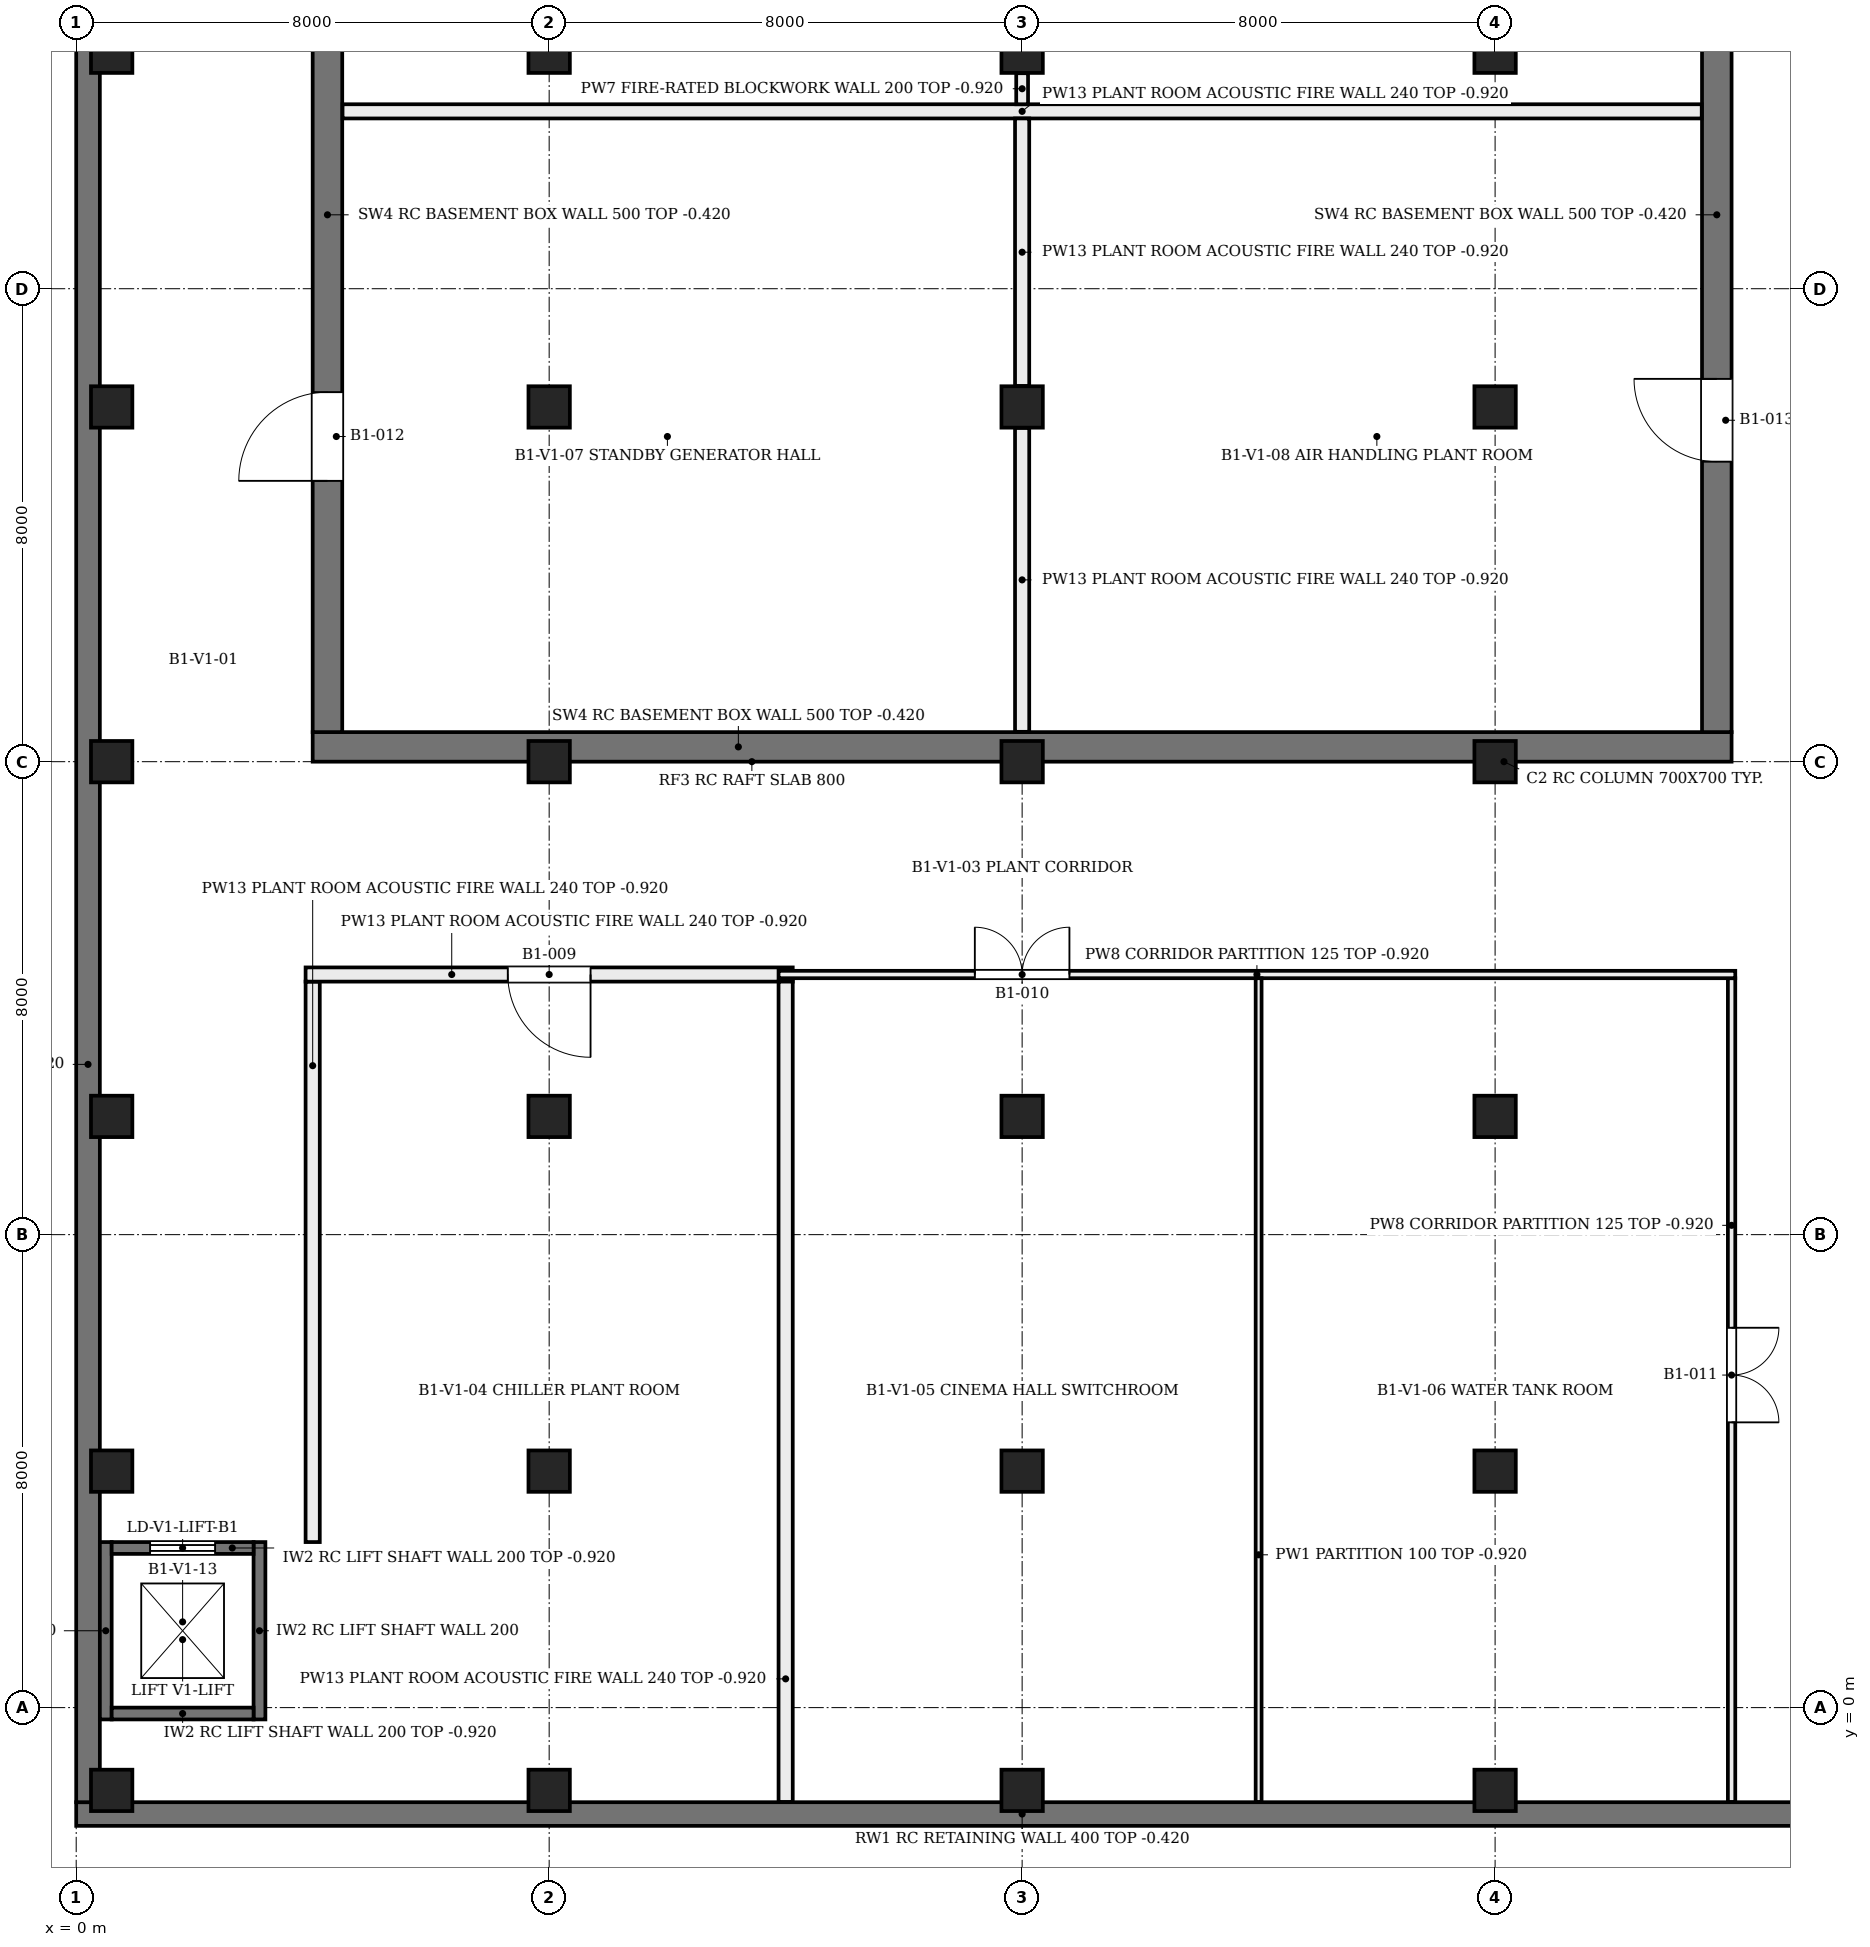
"""IFC4 building model, lengths in metres.
Left out: names, types, materials, properties, quantities, classifications, styles, units other than length and angle.
Written with IfcOpenShell. Run it as: python <this file> out.ifc"""

import sys

from ifc_helpers import new_model, si_unit, direction, frame, frame_2d, origin, origin_2d, place, context, subcontext, project, spatial, rectangle, extrude, element, fill, save


model = new_model("IFC4")
c1 = context("Model", 3, precision=1e-05, world=origin(), true_north=direction((0.0, 1.0)))
c2 = subcontext(c1, "Body", "Model", "MODEL_VIEW")
j1 = project(units=[si_unit("LENGTHUNIT", "METRE"), si_unit("PLANEANGLEUNIT", "RADIAN")], contexts=[c1])
p1 = place(None, origin())
s1 = spatial("IfcSite", under=j1, at=p1, CompositionType="ELEMENT")
p2 = place(p1, origin())
s2 = spatial("IfcBuilding", under=s1, at=p2, CompositionType="ELEMENT")
p3 = place(p2, frame((0.0, 0.0, -4.8)))
s3 = spatial("IfcBuildingStorey", under=s2, at=p3, CompositionType="ELEMENT", Elevation=-4.8)
p4 = place(p3, frame((4.0, 16.25, 0.0), z_axis=(0.0, 0.0, 1.0), x_axis=(1.0, 0.0, 0.0)))
e1 = element("IfcWall", 1, at=p4, inside=s3, PredefinedType="SHEAR", context=c2, shape_type="SweptSolid", body=[
    extrude(rectangle(XDim=24.0, YDim=0.5, at=frame_2d((12.0, 0.0))), origin(), (0.0, 0.0, 1.0), 4.38),
])
p5 = place(p3, frame((4.25, 16.5, 0.0), z_axis=(0.0, 0.0, 1.0), x_axis=(0.0, 1.0, 0.0)))
e2 = element("IfcWall", 2, at=p5, inside=s3, PredefinedType="SHEAR", context=c2, shape_type="SweptSolid", body=[
    extrude(rectangle(XDim=22.4, YDim=0.5, at=frame_2d((11.2, 0.0))), origin(), (0.0, 0.0, 1.0), 4.38),
])
p6 = place(p5, frame((4.25, 0.0, 0.0)))
e3 = element("IfcOpeningElement", 3, at=p6, cuts=e2, PredefinedType="OPENING", context=c2, shape_type="SweptSolid", body=[
    extrude(rectangle(XDim=1.5, YDim=2.7, at=frame_2d((0.75, 1.35))), frame((0.0, 0.26, 0.0), z_axis=(0.0, -1.0, 0.0), x_axis=(1.0, 0.0, 0.0)), (0.0, 0.0, 1.0), 0.52),
])
p7 = place(p5, frame((12.725, 0.0, 0.0)))
e4 = element("IfcOpeningElement", 4, at=p7, cuts=e2, PredefinedType="OPENING", context=c2, shape_type="SweptSolid", body=[
    extrude(rectangle(XDim=1.2, YDim=2.1, at=frame_2d((0.6, 1.05))), frame((0.0, 0.26, 0.0), z_axis=(0.0, -1.0, 0.0), x_axis=(1.0, 0.0, 0.0)), (0.0, 0.0, 1.0), 0.52),
])
p8 = place(p3, frame((27.75, 16.5, 0.0), z_axis=(0.0, 0.0, 1.0), x_axis=(0.0, 1.0, 0.0)))
e5 = element("IfcWall", 5, at=p8, inside=s3, PredefinedType="SHEAR", context=c2, shape_type="SweptSolid", body=[
    extrude(rectangle(XDim=22.4, YDim=0.5, at=frame_2d((11.2, 0.0))), origin(), (0.0, 0.0, 1.0), 4.38),
])
p9 = place(p8, frame((4.575, 0.0, 0.0)))
e6 = element("IfcOpeningElement", 6, at=p9, cuts=e5, PredefinedType="OPENING", context=c2, shape_type="SweptSolid", body=[
    extrude(rectangle(XDim=1.4, YDim=2.4, at=frame_2d((0.7, 1.2))), frame((0.0, 0.26, 0.0), z_axis=(0.0, -1.0, 0.0), x_axis=(1.0, 0.0, 0.0)), (0.0, 0.0, 1.0), 0.52),
])
p10 = place(p8, frame((13.15, 0.0, 0.0)))
e7 = element("IfcOpeningElement", 7, at=p10, cuts=e5, PredefinedType="OPENING", context=c2, shape_type="SweptSolid", body=[
    extrude(rectangle(XDim=0.9, YDim=2.4, at=frame_2d((0.45, 1.2))), frame((0.0, 0.26, 0.0), z_axis=(0.0, -1.0, 0.0), x_axis=(1.0, 0.0, 0.0)), (0.0, 0.0, 1.0), 0.52),
])
p11 = place(p3, frame((0.0, -1.8, 0.0), z_axis=(0.0, 0.0, 1.0), x_axis=(1.0, 0.0, 0.0)))
e8 = element("IfcWall", 8, at=p11, inside=s3, PredefinedType="SOLIDWALL", context=c2, shape_type="SweptSolid", body=[
    extrude(rectangle(XDim=32.0, YDim=0.4, at=frame_2d((16.0, 0.0))), origin(), (0.0, 0.0, 1.0), 4.38),
])
p12 = place(p3, frame((0.2, -1.6, 0.0), z_axis=(0.0, 0.0, 1.0), x_axis=(0.0, 1.0, 0.0)))
e9 = element("IfcWall", 9, at=p12, inside=s3, PredefinedType="SOLIDWALL", context=c2, shape_type="SweptSolid", body=[
    extrude(rectangle(XDim=41.6, YDim=0.4, at=frame_2d((20.8, 0.0))), origin(), (0.0, 0.0, 1.0), 4.38),
])
for number, where, z_axis, x_axis in (
    (10, (0.6, -1.4, 0.0), (0.0, 0.0, 1.0), (1.0, 0.0, 0.0)),
    (11, (0.6, 4.0, 0.0), (0.0, 0.0, 1.0), (1.0, 0.0, 0.0)),
    (12, (0.6, 10.0, 0.0), (0.0, 0.0, 1.0), (1.0, 0.0, 0.0)),
    (13, (0.6, 16.0, 0.0), (0.0, 0.0, 1.0), (1.0, 0.0, 0.0)),
    (14, (0.6, 22.0, 0.0), (0.0, 0.0, 1.0), (1.0, 0.0, 0.0)),
    (15, (0.6, 28.0, 0.0), (0.0, 0.0, 1.0), (1.0, 0.0, 0.0)),
    (16, (8.0, -1.4, 0.0), (0.0, 0.0, 1.0), (1.0, 0.0, 0.0)),
    (17, (8.0, 4.0, 0.0), (0.0, 0.0, 1.0), (1.0, 0.0, 0.0)),
    (18, (8.0, 10.0, 0.0), (0.0, 0.0, 1.0), (1.0, 0.0, 0.0)),
    (19, (8.0, 16.0, 0.0), (0.0, 0.0, 1.0), (1.0, 0.0, 0.0)),
    (20, (8.0, 22.0, 0.0), (0.0, 0.0, 1.0), (1.0, 0.0, 0.0)),
    (21, (8.0, 28.0, 0.0), (0.0, 0.0, 1.0), (1.0, 0.0, 0.0)),
    (22, (16.0, -1.4, 0.0), (0.0, 0.0, 1.0), (1.0, 0.0, 0.0)),
    (23, (16.0, 4.0, 0.0), (0.0, 0.0, 1.0), (1.0, 0.0, 0.0)),
    (24, (16.0, 10.0, 0.0), (0.0, 0.0, 1.0), (1.0, 0.0, 0.0)),
    (25, (16.0, 16.0, 0.0), (0.0, 0.0, 1.0), (1.0, 0.0, 0.0)),
    (26, (16.0, 22.0, 0.0), (0.0, 0.0, 1.0), (1.0, 0.0, 0.0)),
    (27, (16.0, 28.0, 0.0), (0.0, 0.0, 1.0), (1.0, 0.0, 0.0)),
    (28, (24.0, -1.4, 0.0), (0.0, 0.0, 1.0), (1.0, 0.0, 0.0)),
    (29, (24.0, 4.0, 0.0), (0.0, 0.0, 1.0), (1.0, 0.0, 0.0)),
    (30, (24.0, 10.0, 0.0), (0.0, 0.0, 1.0), (1.0, 0.0, 0.0)),
    (31, (24.0, 16.0, 0.0), (0.0, 0.0, 1.0), (1.0, 0.0, 0.0)),
    (32, (24.0, 22.0, 0.0), (0.0, 0.0, 1.0), (1.0, 0.0, 0.0)),
    (33, (24.0, 28.0, 0.0), (0.0, 0.0, 1.0), (1.0, 0.0, 0.0)),
):
    element("IfcColumn", number, at=place(p3, frame(where, z_axis=z_axis, x_axis=x_axis)), inside=s3, PredefinedType="COLUMN", context=c2, shape_type="SweptSolid", body=[
        extrude(rectangle(XDim=0.7, YDim=0.7, at=origin_2d()), origin(), (0.0, 0.0, 1.0), 4.38),
    ])
p13 = place(p3, frame((0.5, -0.2, 0.0), z_axis=(0.0, 0.0, 1.0), x_axis=(0.0, 1.0, 0.0)))
e34 = element("IfcWall", 34, at=p13, inside=s3, PredefinedType="SOLIDWALL", context=c2, shape_type="SweptSolid", body=[
    extrude(rectangle(XDim=3.0, YDim=0.2, at=frame_2d((1.5, 0.0))), origin(), (0.0, 0.0, 1.0), 3.88),
])
p14 = place(p3, frame((3.1, -0.2, 0.0), z_axis=(0.0, 0.0, 1.0), x_axis=(0.0, 1.0, 0.0)))
e35 = element("IfcWall", 35, at=p14, inside=s3, PredefinedType="SOLIDWALL", context=c2, shape_type="SweptSolid", body=[
    extrude(rectangle(XDim=3.0, YDim=0.2, at=frame_2d((1.5, 0.0))), origin(), (0.0, 0.0, 1.0), 4.55),
])
p15 = place(p3, frame((0.6, -0.1, 0.0), z_axis=(0.0, 0.0, 1.0), x_axis=(1.0, 0.0, 0.0)))
e36 = element("IfcWall", 36, at=p15, inside=s3, PredefinedType="SOLIDWALL", context=c2, shape_type="SweptSolid", body=[
    extrude(rectangle(XDim=2.4, YDim=0.2, at=frame_2d((1.2, 0.0))), origin(), (0.0, 0.0, 1.0), 3.88),
])
p16 = place(p3, frame((0.6, 2.7, 0.0), z_axis=(0.0, 0.0, 1.0), x_axis=(1.0, 0.0, 0.0)))
e37 = element("IfcWall", 37, at=p16, inside=s3, PredefinedType="SOLIDWALL", context=c2, shape_type="SweptSolid", body=[
    extrude(rectangle(XDim=2.4, YDim=0.2, at=frame_2d((1.2, 0.0))), origin(), (0.0, 0.0, 1.0), 3.88),
])
p17 = place(p16, frame((0.65, 0.0, 0.0)))
e38 = element("IfcOpeningElement", 38, at=p17, cuts=e37, PredefinedType="OPENING", context=c2, shape_type="SweptSolid", body=[
    extrude(rectangle(XDim=1.1, YDim=2.1, at=frame_2d((0.55, 1.05))), frame((0.0, 0.11, 0.0), z_axis=(0.0, -1.0, 0.0), x_axis=(1.0, 0.0, 0.0)), (0.0, 0.0, 1.0), 0.22),
])
p18 = place(p3, frame((4.0, 2.8, 0.0), z_axis=(0.0, 0.0, 1.0), x_axis=(0.0, 1.0, 0.0)))
e39 = element("IfcWall", 39, at=p18, inside=s3, PredefinedType="PARTITIONING", context=c2, shape_type="SweptSolid", body=[
    extrude(rectangle(XDim=9.48, YDim=0.24, at=frame_2d((4.74, 0.0))), origin(), (0.0, 0.0, 1.0), 3.88),
])
p19 = place(p3, frame((28.0, -1.595, 0.0), z_axis=(0.0, 0.0, 1.0), x_axis=(0.0, 1.0, 0.0)))
e40 = element("IfcWall", 40, at=p19, inside=s3, PredefinedType="PARTITIONING", context=c2, shape_type="SweptSolid", body=[
    extrude(rectangle(XDim=13.932, YDim=0.125, at=frame_2d((6.966, 0.0))), origin(), (0.0, 0.0, 1.0), 3.88),
])
p20 = place(p19, frame((6.42, 0.0, 0.0)))
e41 = element("IfcOpeningElement", 41, at=p20, cuts=e40, PredefinedType="OPENING", context=c2, shape_type="SweptSolid", body=[
    extrude(rectangle(XDim=1.6, YDim=2.2, at=frame_2d((0.8, 1.1))), frame((0.0, 0.073, 0.0), z_axis=(0.0, -1.0, 0.0), x_axis=(1.0, 0.0, 0.0)), (0.0, 0.0, 1.0), 0.145),
])
p21 = place(p3, frame((3.88, 12.4, 0.0), z_axis=(0.0, 0.0, 1.0), x_axis=(1.0, 0.0, 0.0)))
e42 = element("IfcWall", 42, at=p21, inside=s3, PredefinedType="PARTITIONING", context=c2, shape_type="SweptSolid", body=[
    extrude(rectangle(XDim=8.24, YDim=0.24, at=frame_2d((4.12, 0.0))), origin(), (0.0, 0.0, 1.0), 3.88),
])
p22 = place(p21, frame((3.42, 0.0, 0.0)))
e43 = element("IfcOpeningElement", 43, at=p22, cuts=e42, PredefinedType="OPENING", context=c2, shape_type="SweptSolid", body=[
    extrude(rectangle(XDim=1.4, YDim=2.4, at=frame_2d((0.7, 1.2))), frame((0.0, 0.13, 0.0), z_axis=(0.0, -1.0, 0.0), x_axis=(1.0, 0.0, 0.0)), (0.0, 0.0, 1.0), 0.26),
])
p23 = place(p3, frame((11.88, 12.4, 0.0), z_axis=(0.0, 0.0, 1.0), x_axis=(1.0, 0.0, 0.0)))
e44 = element("IfcWall", 44, at=p23, inside=s3, PredefinedType="PARTITIONING", context=c2, shape_type="SweptSolid", body=[
    extrude(rectangle(XDim=16.183, YDim=0.125, at=frame_2d((8.091, 0.0))), origin(), (0.0, 0.0, 1.0), 3.88),
])
p24 = place(p23, frame((3.32, 0.0, 0.0)))
e45 = element("IfcOpeningElement", 45, at=p24, cuts=e44, PredefinedType="OPENING", context=c2, shape_type="SweptSolid", body=[
    extrude(rectangle(XDim=1.6, YDim=2.2, at=frame_2d((0.8, 1.1))), frame((0.0, 0.073, 0.0), z_axis=(0.0, -1.0, 0.0), x_axis=(1.0, 0.0, 0.0)), (0.0, 0.0, 1.0), 0.145),
])
p25 = place(p3, frame((12.0, -1.595, 0.0), z_axis=(0.0, 0.0, 1.0), x_axis=(0.0, 1.0, 0.0)))
e46 = element("IfcWall", 46, at=p25, inside=s3, PredefinedType="PARTITIONING", context=c2, shape_type="SweptSolid", body=[
    extrude(rectangle(XDim=13.875, YDim=0.24, at=frame_2d((6.938, 0.0))), origin(), (0.0, 0.0, 1.0), 3.88),
])
p26 = place(p3, frame((20.0, -1.595, 0.0), z_axis=(0.0, 0.0, 1.0), x_axis=(0.0, 1.0, 0.0)))
e47 = element("IfcWall", 47, at=p26, inside=s3, PredefinedType="PARTITIONING", context=c2, shape_type="SweptSolid", body=[
    extrude(rectangle(XDim=13.932, YDim=0.1, at=frame_2d((6.966, 0.0))), origin(), (0.0, 0.0, 1.0), 3.88),
])
p27 = place(p3, frame((4.505, 27.0, 0.0), z_axis=(0.0, 0.0, 1.0), x_axis=(1.0, 0.0, 0.0)))
e48 = element("IfcWall", 48, at=p27, inside=s3, PredefinedType="PARTITIONING", context=c2, shape_type="SweptSolid", body=[
    extrude(rectangle(XDim=22.99, YDim=0.24, at=frame_2d((11.495, 0.0))), origin(), (0.0, 0.0, 1.0), 3.88),
])
p28 = place(p3, frame((16.0, 16.505, 0.0), z_axis=(0.0, 0.0, 1.0), x_axis=(0.0, 1.0, 0.0)))
e49 = element("IfcWall", 49, at=p28, inside=s3, PredefinedType="PARTITIONING", context=c2, shape_type="SweptSolid", body=[
    extrude(rectangle(XDim=5.14, YDim=0.24, at=frame_2d((2.57, 0.0))), origin(), (0.0, 0.0, 1.0), 3.88),
])
p29 = place(p3, frame((16.0, 22.355, 0.0), z_axis=(0.0, 0.0, 1.0), x_axis=(0.0, 1.0, 0.0)))
e50 = element("IfcWall", 50, at=p29, inside=s3, PredefinedType="PARTITIONING", context=c2, shape_type="SweptSolid", body=[
    extrude(rectangle(XDim=4.525, YDim=0.24, at=frame_2d((2.262, 0.0))), origin(), (0.0, 0.0, 1.0), 3.88),
])
p30 = place(p3, frame((16.0, 27.12, 0.0), z_axis=(0.0, 0.0, 1.0), x_axis=(0.0, 1.0, 0.0)))
e51 = element("IfcWall", 51, at=p30, inside=s3, PredefinedType="PARTITIONING", context=c2, shape_type="SweptSolid", body=[
    extrude(rectangle(XDim=0.525, YDim=0.2, at=frame_2d((0.262, 0.0))), origin(), (0.0, 0.0, 1.0), 3.88),
])
p31 = place(p17, origin())
e52 = element("IfcDoor", 52, at=p31, inside=s3, OperationType="DOUBLE_DOOR_SLIDING", PredefinedType="DOOR", context=c2, shape_type="SweptSolid", body=[
    extrude(rectangle(XDim=1.1, YDim=2.1, at=frame_2d((0.55, 1.05))), frame((0.0, 0.025, 0.0), z_axis=(0.0, -1.0, 0.0), x_axis=(1.0, 0.0, 0.0)), (0.0, 0.0, 1.0), 0.05),
])
fill(e38, e52)
p32 = place(p22, origin())
e53 = element("IfcDoor", 53, at=p32, inside=s3, OperationType="SINGLE_SWING_RIGHT", PredefinedType="DOOR", context=c2, shape_type="SweptSolid", body=[
    extrude(rectangle(XDim=1.4, YDim=2.4, at=frame_2d((0.7, 1.2))), frame((0.0, 0.025, 0.0), z_axis=(0.0, -1.0, 0.0), x_axis=(1.0, 0.0, 0.0)), (0.0, 0.0, 1.0), 0.05),
])
fill(e43, e53)
p33 = place(p24, origin())
e54 = element("IfcDoor", 54, at=p33, inside=s3, OperationType="DOUBLE_DOOR_SINGLE_SWING", PredefinedType="DOOR", context=c2, shape_type="SweptSolid", body=[
    extrude(rectangle(XDim=1.6, YDim=2.2, at=frame_2d((0.8, 1.1))), frame((0.0, 0.025, 0.0), z_axis=(0.0, -1.0, 0.0), x_axis=(1.0, 0.0, 0.0)), (0.0, 0.0, 1.0), 0.05),
])
fill(e45, e54)
p34 = place(p20, frame((1.6, 0.0, 0.0), z_axis=(0.0, 0.0, 1.0), x_axis=(-1.0, 0.0, 0.0)))
e55 = element("IfcDoor", 55, at=p34, inside=s3, OperationType="DOUBLE_DOOR_SINGLE_SWING", PredefinedType="DOOR", context=c2, shape_type="SweptSolid", body=[
    extrude(rectangle(XDim=1.6, YDim=2.2, at=frame_2d((0.8, 1.1))), frame((0.0, 0.025, 0.0), z_axis=(0.0, -1.0, 0.0), x_axis=(1.0, 0.0, 0.0)), (0.0, 0.0, 1.0), 0.05),
])
fill(e41, e55)
p35 = place(p6, origin())
e56 = element("IfcDoor", 56, at=p35, inside=s3, OperationType="SINGLE_SWING_LEFT", PredefinedType="DOOR", context=c2, shape_type="SweptSolid", body=[
    extrude(rectangle(XDim=1.5, YDim=2.7, at=frame_2d((0.75, 1.35))), frame((0.0, 0.025, 0.0), z_axis=(0.0, -1.0, 0.0), x_axis=(1.0, 0.0, 0.0)), (0.0, 0.0, 1.0), 0.05),
])
fill(e3, e56)
p36 = place(p9, frame((1.4, 0.0, 0.0), z_axis=(0.0, 0.0, 1.0), x_axis=(-1.0, 0.0, 0.0)))
e57 = element("IfcDoor", 57, at=p36, inside=s3, OperationType="SINGLE_SWING_RIGHT", PredefinedType="DOOR", context=c2, shape_type="SweptSolid", body=[
    extrude(rectangle(XDim=1.4, YDim=2.4, at=frame_2d((0.7, 1.2))), frame((0.0, 0.025, 0.0), z_axis=(0.0, -1.0, 0.0), x_axis=(1.0, 0.0, 0.0)), (0.0, 0.0, 1.0), 0.05),
])
fill(e6, e57)
save(model, sys.argv[1])
